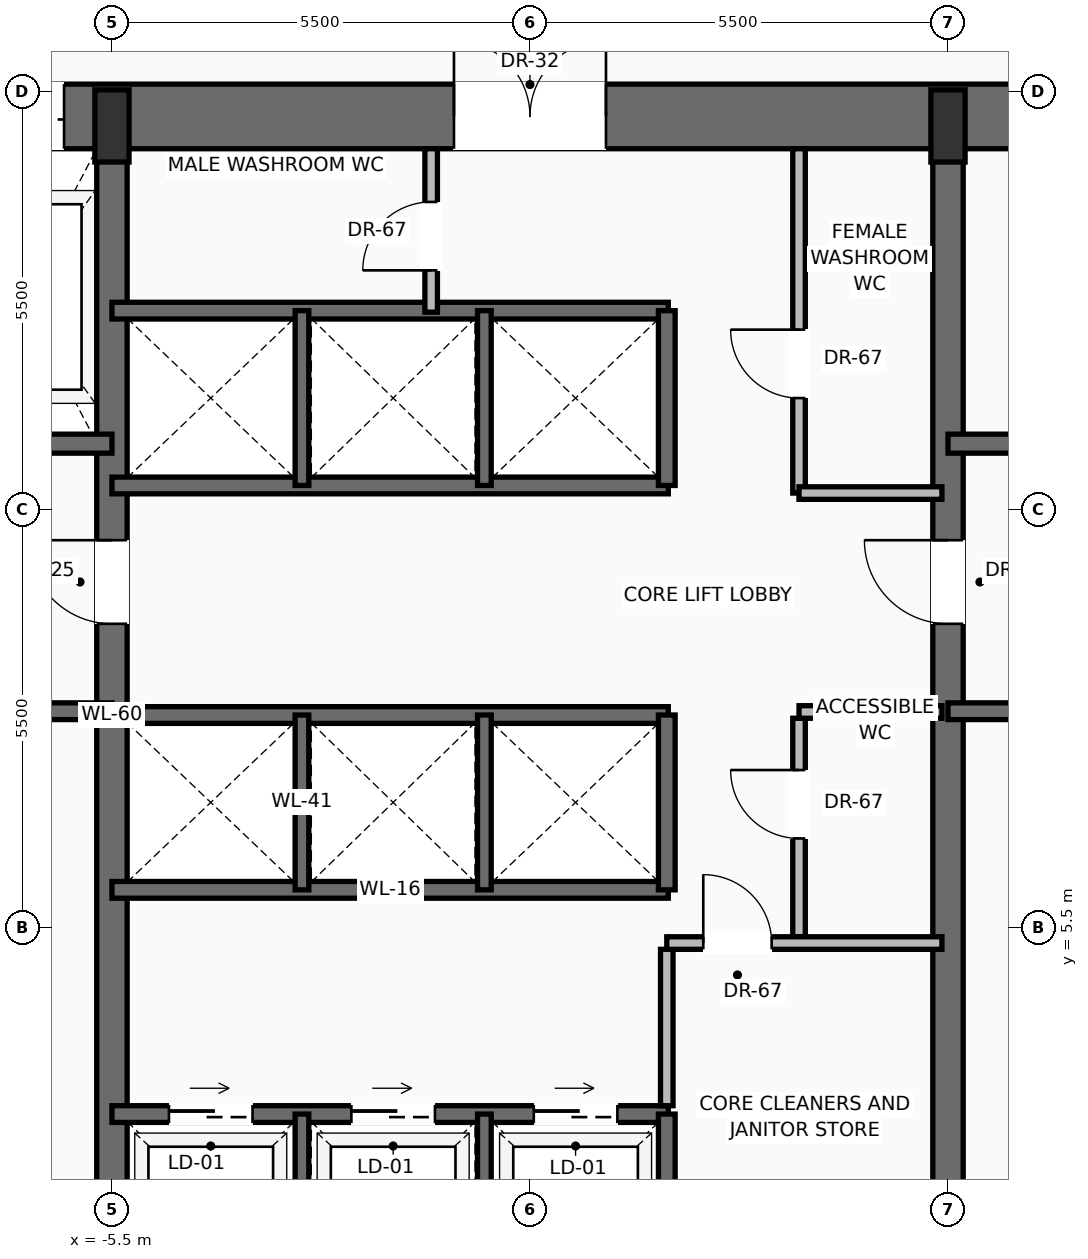
"""IFC4 building model, lengths in metres.
Left out: names, types, materials, properties, quantities, classifications, styles, units other than length and angle.
Written with IfcOpenShell. Run it as: python <this file> out.ifc"""

import sys

from ifc_helpers import new_model, si_unit, direction, frame, frame_2d, origin, origin_2d, place, context, subcontext, project, spatial, rectangle, extrude, source, transform, mapped, element, fill, save


model = new_model("IFC4")
c1 = context("Model", 3, precision=1e-05, world=origin(), true_north=direction((0.0, 1.0)))
c2 = subcontext(c1, "Body", "Model", "MODEL_VIEW")
j1 = project(units=[si_unit("LENGTHUNIT", "METRE"), si_unit("PLANEANGLEUNIT", "RADIAN")], contexts=[c1])
p1 = place(None, origin())
s1 = spatial("IfcSite", under=j1, at=p1, CompositionType="ELEMENT")
p2 = place(p1, origin())
s2 = spatial("IfcBuilding", under=s1, at=p2, CompositionType="ELEMENT")
p3 = place(p2, frame((0.0, 0.0, 53.4)))
s3 = spatial("IfcBuildingStorey", under=s2, at=p3, CompositionType="ELEMENT", Elevation=53.4)
p4 = place(p3, frame((-11.0, 16.175, 0.0), z_axis=(0.0, 0.0, 1.0), x_axis=(1.0, 0.0, 0.0)))
e1 = element("IfcWall", 1, at=p4, inside=s3, PredefinedType="SHEAR", context=c2, shape_type="SweptSolid", body=[
    extrude(rectangle(XDim=22.0, YDim=0.85, at=frame_2d((11.0, 0.0))), origin(), (0.0, 0.0, 1.0), 3.45),
])
p5 = place(p4, frame((3.57, 0.0, 0.0)))
e2 = element("IfcOpeningElement", 2, at=p5, cuts=e1, PredefinedType="OPENING", context=c2, shape_type="SweptSolid", body=[
    extrude(rectangle(XDim=1.3, YDim=2.3, at=frame_2d((0.65, 1.15))), frame((0.0, 0.435, 0.0), z_axis=(0.0, -1.0, 0.0), x_axis=(1.0, 0.0, 0.0)), (0.0, 0.0, 1.0), 0.87),
])
p6 = place(p4, frame((10.0, 0.0, 0.0)))
e3 = element("IfcOpeningElement", 3, at=p6, cuts=e1, PredefinedType="OPENING", context=c2, shape_type="SweptSolid", body=[
    extrude(rectangle(XDim=2.0, YDim=2.4, at=frame_2d((1.0, 1.2))), frame((0.0, 0.435, 0.0), z_axis=(0.0, -1.0, 0.0), x_axis=(1.0, 0.0, 0.0)), (0.0, 0.0, 1.0), 0.87),
])
p7 = place(p3, frame((-5.5, 0.425, 0.0), z_axis=(0.0, 0.0, 1.0), x_axis=(0.0, 1.0, 0.0)))
e4 = element("IfcWall", 4, at=p7, inside=s3, PredefinedType="SHEAR", context=c2, shape_type="SweptSolid", body=[
    extrude(rectangle(XDim=15.75, YDim=0.4, at=frame_2d((7.875, 0.0))), origin(), (0.0, 0.0, 1.0), 3.45),
])
p8 = place(p7, frame((9.075, 0.0, 0.0)))
e5 = element("IfcOpeningElement", 5, at=p8, cuts=e4, PredefinedType="OPENING", context=c2, shape_type="SweptSolid", body=[
    extrude(rectangle(XDim=1.1, YDim=2.2, at=frame_2d((0.55, 1.1))), frame((0.0, 0.21, 0.0), z_axis=(0.0, -1.0, 0.0), x_axis=(1.0, 0.0, 0.0)), (0.0, 0.0, 1.0), 0.42),
])
p9 = place(p3, frame((5.5, 0.425, 0.0), z_axis=(0.0, 0.0, 1.0), x_axis=(0.0, 1.0, 0.0)))
e6 = element("IfcWall", 6, at=p9, inside=s3, PredefinedType="SHEAR", context=c2, shape_type="SweptSolid", body=[
    extrude(rectangle(XDim=15.75, YDim=0.4, at=frame_2d((7.875, 0.0))), origin(), (0.0, 0.0, 1.0), 3.45),
])
p10 = place(p9, frame((9.075, 0.0, 0.0)))
e7 = element("IfcOpeningElement", 7, at=p10, cuts=e6, PredefinedType="OPENING", context=c2, shape_type="SweptSolid", body=[
    extrude(rectangle(XDim=1.1, YDim=2.2, at=frame_2d((0.55, 1.1))), frame((0.0, 0.21, 0.0), z_axis=(0.0, -1.0, 0.0), x_axis=(1.0, 0.0, 0.0)), (0.0, 0.0, 1.0), 0.42),
])
m1 = source(origin(), c2, "Body", "SweptSolid", [
    extrude(rectangle(XDim=0.45, YDim=0.95, at=origin_2d()), origin(), (0.0, 0.0, 1.0), 3.7),
])
for number, where, z_axis, x_axis in (
    (8, (-5.5, 16.05, 0.0), (0.0, 0.0, 1.0), (1.0, 0.0, 0.0)),
    (9, (5.5, 16.05, 0.0), (0.0, 0.0, 1.0), (1.0, 0.0, 0.0)),
):
    element("IfcColumn", number, at=place(p3, frame(where, z_axis=z_axis, x_axis=x_axis)), inside=s3, PredefinedType="PILASTER", context=c2, shape_type="MappedRepresentation", body=[
        mapped(m1, transform((0.0, 0.0, 0.0), scale=1.0)),
    ])
p11 = place(p3, frame((-5.5, 8.35, 0.0), z_axis=(0.0, 0.0, 1.0), x_axis=(-1.0, 0.0, 0.0)))
e10 = element("IfcWall", 10, at=p11, inside=s3, PredefinedType="SOLIDWALL", context=c2, shape_type="SweptSolid", body=[
    extrude(rectangle(XDim=4.65, YDim=0.22, at=frame_2d((2.325, 0.0))), origin(), (0.0, 0.0, 1.0), 3.45),
])
p12 = place(p11, frame((2.5, 0.0, 0.0)))
e11 = element("IfcOpeningElement", 11, at=p12, cuts=e10, PredefinedType="OPENING", context=c2, shape_type="SweptSolid", body=[
    extrude(rectangle(XDim=1.15, YDim=2.2, at=frame_2d((0.575, 1.1))), frame((0.0, 0.12, 0.0), z_axis=(0.0, -1.0, 0.0), x_axis=(1.0, 0.0, 0.0)), (0.0, 0.0, 1.0), 0.24),
])
p13 = place(p3, frame((-5.5, 11.87, 0.0), z_axis=(0.0, 0.0, 1.0), x_axis=(-1.0, 0.0, 0.0)))
e12 = element("IfcWall", 12, at=p13, inside=s3, PredefinedType="SOLIDWALL", context=c2, shape_type="SweptSolid", body=[
    extrude(rectangle(XDim=4.65, YDim=0.25, at=frame_2d((2.325, 0.0))), origin(), (0.0, 0.0, 1.0), 3.45),
])
p14 = place(p13, frame((2.95, 0.0, 0.0)))
e13 = element("IfcOpeningElement", 13, at=p14, cuts=e12, PredefinedType="OPENING", context=c2, shape_type="SweptSolid", body=[
    extrude(rectangle(XDim=1.2, YDim=2.25, at=frame_2d((0.6, 1.125))), frame((0.0, 0.135, 0.0), z_axis=(0.0, -1.0, 0.0), x_axis=(1.0, 0.0, 0.0)), (0.0, 0.0, 1.0), 0.27),
])
p15 = place(p3, frame((10.15, 8.35, 0.0), z_axis=(0.0, 0.0, 1.0), x_axis=(-1.0, 0.0, 0.0)))
e14 = element("IfcWall", 14, at=p15, inside=s3, PredefinedType="SOLIDWALL", context=c2, shape_type="SweptSolid", body=[
    extrude(rectangle(XDim=4.65, YDim=0.22, at=frame_2d((2.325, 0.0))), origin(), (0.0, 0.0, 1.0), 3.45),
])
p16 = place(p15, frame((1.0, 0.0, 0.0)))
e15 = element("IfcOpeningElement", 15, at=p16, cuts=e14, PredefinedType="OPENING", context=c2, shape_type="SweptSolid", body=[
    extrude(rectangle(XDim=1.15, YDim=2.2, at=frame_2d((0.575, 1.1))), frame((0.0, 0.12, 0.0), z_axis=(0.0, -1.0, 0.0), x_axis=(1.0, 0.0, 0.0)), (0.0, 0.0, 1.0), 0.24),
])
p17 = place(p3, frame((10.15, 11.87, 0.0), z_axis=(0.0, 0.0, 1.0), x_axis=(-1.0, 0.0, 0.0)))
e16 = element("IfcWall", 16, at=p17, inside=s3, PredefinedType="SOLIDWALL", context=c2, shape_type="SweptSolid", body=[
    extrude(rectangle(XDim=4.65, YDim=0.25, at=frame_2d((2.325, 0.0))), origin(), (0.0, 0.0, 1.0), 3.45),
])
p18 = place(p17, frame((0.5, 0.0, 0.0)))
e17 = element("IfcOpeningElement", 17, at=p18, cuts=e16, PredefinedType="OPENING", context=c2, shape_type="SweptSolid", body=[
    extrude(rectangle(XDim=1.2, YDim=2.25, at=frame_2d((0.6, 1.125))), frame((0.0, 0.135, 0.0), z_axis=(0.0, -1.0, 0.0), x_axis=(1.0, 0.0, 0.0)), (0.0, 0.0, 1.0), 0.27),
])
p19 = place(p3, frame((-5.5, 3.05, 0.0), z_axis=(0.0, 0.0, 1.0), x_axis=(1.0, 0.0, 0.0)))
e18 = element("IfcWall", 18, at=p19, inside=s3, PredefinedType="SOLIDWALL", context=c2, shape_type="SweptSolid", body=[
    extrude(rectangle(XDim=7.32, YDim=0.22, at=frame_2d((3.66, 0.0))), origin(), (0.0, 0.0, 1.0), 3.45),
])
p20 = place(p19, frame((0.75, 0.0, 0.0)))
e19 = element("IfcOpeningElement", 19, at=p20, cuts=e18, PredefinedType="OPENING", context=c2, shape_type="SweptSolid", body=[
    extrude(rectangle(XDim=1.1, YDim=2.2, at=frame_2d((0.55, 1.1))), frame((0.0, 0.12, 0.0), z_axis=(0.0, -1.0, 0.0), x_axis=(1.0, 0.0, 0.0)), (0.0, 0.0, 1.0), 0.24),
])
p21 = place(p19, frame((3.15, 0.0, 0.0)))
e20 = element("IfcOpeningElement", 20, at=p21, cuts=e18, PredefinedType="OPENING", context=c2, shape_type="SweptSolid", body=[
    extrude(rectangle(XDim=1.1, YDim=2.2, at=frame_2d((0.55, 1.1))), frame((0.0, 0.12, 0.0), z_axis=(0.0, -1.0, 0.0), x_axis=(1.0, 0.0, 0.0)), (0.0, 0.0, 1.0), 0.24),
])
p22 = place(p19, frame((5.55, 0.0, 0.0)))
e21 = element("IfcOpeningElement", 21, at=p22, cuts=e18, PredefinedType="OPENING", context=c2, shape_type="SweptSolid", body=[
    extrude(rectangle(XDim=1.1, YDim=2.2, at=frame_2d((0.55, 1.1))), frame((0.0, 0.12, 0.0), z_axis=(0.0, -1.0, 0.0), x_axis=(1.0, 0.0, 0.0)), (0.0, 0.0, 1.0), 0.24),
])
p23 = place(p3, frame((1.8, 0.85, 0.0), z_axis=(0.0, 0.0, 1.0), x_axis=(0.0, 1.0, 0.0)))
e22 = element("IfcWall", 22, at=p23, inside=s3, PredefinedType="SOLIDWALL", context=c2, shape_type="SweptSolid", body=[
    extrude(rectangle(XDim=2.2, YDim=0.22, at=frame_2d((1.1, 0.0))), origin(), (0.0, 0.0, 1.0), 3.45),
])
for number, where, z_axis, x_axis in (
    (23, (-3.0, 0.85, 0.0), (0.0, 0.0, 1.0), (0.0, 1.0, 0.0)),
    (24, (-0.6, 0.85, 0.0), (0.0, 0.0, 1.0), (0.0, 1.0, 0.0)),
):
    element("IfcWall", number, at=place(p3, frame(where, z_axis=z_axis, x_axis=x_axis)), inside=s3, PredefinedType="SOLIDWALL", context=c2, shape_type="SweptSolid", body=[
        extrude(rectangle(XDim=2.2, YDim=0.18, at=frame_2d((1.1, 0.0))), origin(), (0.0, 0.0, 1.0), 3.45),
    ])
p24 = place(p3, frame((1.8, 3.16, 0.0), z_axis=(0.0, 0.0, 1.0), x_axis=(0.0, 1.0, 0.0)))
e25 = element("IfcWall", 25, at=p24, inside=s3, PredefinedType="PARTITIONING", context=c2, shape_type="SweptSolid", body=[
    extrude(rectangle(XDim=2.058, YDim=0.165, at=frame_2d((1.029, 0.0))), origin(), (0.0, 0.0, 1.0), 3.442),
])
p25 = place(p3, frame((3.54, 5.383, 0.0), z_axis=(0.0, 0.0, 1.0), x_axis=(0.0, 1.0, 0.0)))
e26 = element("IfcWall", 26, at=p25, inside=s3, PredefinedType="PARTITIONING", context=c2, shape_type="SweptSolid", body=[
    extrude(rectangle(XDim=2.875, YDim=0.165, at=frame_2d((1.438, 0.0))), origin(), (0.0, 0.0, 1.0), 3.442),
])
p26 = place(p25, frame((1.294, 0.0, 0.0)))
e27 = element("IfcOpeningElement", 27, at=p26, cuts=e26, PredefinedType="OPENING", context=c2, shape_type="SweptSolid", body=[
    extrude(rectangle(XDim=0.9, YDim=2.1, at=frame_2d((0.45, 1.05))), frame((0.0, 0.093, 0.0), z_axis=(0.0, -1.0, 0.0), x_axis=(1.0, 0.0, 0.0)), (0.0, 0.0, 1.0), 0.185),
])
p27 = place(p3, frame((3.54, 8.34, 0.0), z_axis=(0.0, 0.0, 1.0), x_axis=(1.0, 0.0, 0.0)))
e28 = element("IfcWall", 28, at=p27, inside=s3, PredefinedType="PARTITIONING", context=c2, shape_type="SweptSolid", body=[
    extrude(rectangle(XDim=1.88, YDim=0.165, at=frame_2d((0.94, 0.0))), origin(), (0.0, 0.0, 1.0), 3.442),
])
p28 = place(p3, frame((1.8, 5.3, 0.0), z_axis=(0.0, 0.0, 1.0), x_axis=(1.0, 0.0, 0.0)))
e29 = element("IfcWall", 29, at=p28, inside=s3, PredefinedType="PARTITIONING", context=c2, shape_type="SweptSolid", body=[
    extrude(rectangle(XDim=3.62, YDim=0.165, at=frame_2d((1.81, 0.0))), origin(), (0.0, 0.0, 1.0), 3.442),
])
p29 = place(p28, frame((0.48, 0.0, 0.0)))
e30 = element("IfcOpeningElement", 30, at=p29, cuts=e29, PredefinedType="OPENING", context=c2, shape_type="SweptSolid", body=[
    extrude(rectangle(XDim=0.9, YDim=2.1, at=frame_2d((0.45, 1.05))), frame((0.0, 0.093, 0.0), z_axis=(0.0, -1.0, 0.0), x_axis=(1.0, 0.0, 0.0)), (0.0, 0.0, 1.0), 0.185),
])
for number, where, z_axis, x_axis in (
    (31, (-5.5, 6.0, 0.0), (0.0, 0.0, 1.0), (1.0, 0.0, 0.0)),
    (32, (-5.5, 8.3, 0.0), (0.0, 0.0, 1.0), (1.0, 0.0, 0.0)),
):
    element("IfcWall", number, at=place(p3, frame(where, z_axis=z_axis, x_axis=x_axis)), inside=s3, PredefinedType="SOLIDWALL", context=c2, shape_type="SweptSolid", body=[
        extrude(rectangle(XDim=7.32, YDim=0.22, at=frame_2d((3.66, 0.0))), origin(), (0.0, 0.0, 1.0), 3.45),
    ])
p30 = place(p3, frame((1.8, 6.0, 0.0), z_axis=(0.0, 0.0, 1.0), x_axis=(0.0, 1.0, 0.0)))
e33 = element("IfcWall", 33, at=p30, inside=s3, PredefinedType="SOLIDWALL", context=c2, shape_type="SweptSolid", body=[
    extrude(rectangle(XDim=2.3, YDim=0.22, at=frame_2d((1.15, 0.0))), origin(), (0.0, 0.0, 1.0), 3.45),
])
for number, where, z_axis, x_axis in (
    (34, (-3.0, 6.0, 0.0), (0.0, 0.0, 1.0), (0.0, 1.0, 0.0)),
    (35, (-0.6, 6.0, 0.0), (0.0, 0.0, 1.0), (0.0, 1.0, 0.0)),
):
    element("IfcWall", number, at=place(p3, frame(where, z_axis=z_axis, x_axis=x_axis)), inside=s3, PredefinedType="SOLIDWALL", context=c2, shape_type="SweptSolid", body=[
        extrude(rectangle(XDim=2.3, YDim=0.18, at=frame_2d((1.15, 0.0))), origin(), (0.0, 0.0, 1.0), 3.45),
    ])
for number, where, z_axis, x_axis in (
    (36, (-5.5, 11.32, 0.0), (0.0, 0.0, 1.0), (1.0, 0.0, 0.0)),
    (37, (-5.5, 13.62, 0.0), (0.0, 0.0, 1.0), (1.0, 0.0, 0.0)),
):
    element("IfcWall", number, at=place(p3, frame(where, z_axis=z_axis, x_axis=x_axis)), inside=s3, PredefinedType="SOLIDWALL", context=c2, shape_type="SweptSolid", body=[
        extrude(rectangle(XDim=7.32, YDim=0.22, at=frame_2d((3.66, 0.0))), origin(), (0.0, 0.0, 1.0), 3.45),
    ])
p31 = place(p3, frame((1.8, 11.32, 0.0), z_axis=(0.0, 0.0, 1.0), x_axis=(0.0, 1.0, 0.0)))
e38 = element("IfcWall", 38, at=p31, inside=s3, PredefinedType="SOLIDWALL", context=c2, shape_type="SweptSolid", body=[
    extrude(rectangle(XDim=2.3, YDim=0.22, at=frame_2d((1.15, 0.0))), origin(), (0.0, 0.0, 1.0), 3.45),
])
for number, where, z_axis, x_axis in (
    (39, (-3.0, 11.32, 0.0), (0.0, 0.0, 1.0), (0.0, 1.0, 0.0)),
    (40, (-0.6, 11.32, 0.0), (0.0, 0.0, 1.0), (0.0, 1.0, 0.0)),
):
    element("IfcWall", number, at=place(p3, frame(where, z_axis=z_axis, x_axis=x_axis)), inside=s3, PredefinedType="SOLIDWALL", context=c2, shape_type="SweptSolid", body=[
        extrude(rectangle(XDim=2.3, YDim=0.18, at=frame_2d((1.15, 0.0))), origin(), (0.0, 0.0, 1.0), 3.45),
    ])
p32 = place(p3, frame((-1.3, 13.6, 0.0), z_axis=(0.0, 0.0, 1.0), x_axis=(0.0, 1.0, 0.0)))
e41 = element("IfcWall", 41, at=p32, inside=s3, PredefinedType="PARTITIONING", context=c2, shape_type="SweptSolid", body=[
    extrude(rectangle(XDim=2.15, YDim=0.165, at=frame_2d((1.075, 0.0))), origin(), (0.0, 0.0, 1.0), 3.442),
])
p33 = place(p32, frame((0.55, 0.0, 0.0)))
e42 = element("IfcOpeningElement", 42, at=p33, cuts=e41, PredefinedType="OPENING", context=c2, shape_type="SweptSolid", body=[
    extrude(rectangle(XDim=0.9, YDim=2.1, at=frame_2d((0.45, 1.05))), frame((0.0, 0.093, 0.0), z_axis=(0.0, -1.0, 0.0), x_axis=(1.0, 0.0, 0.0)), (0.0, 0.0, 1.0), 0.185),
])
p34 = place(p3, frame((3.54, 11.22, 0.0), z_axis=(0.0, 0.0, 1.0), x_axis=(0.0, 1.0, 0.0)))
e43 = element("IfcWall", 43, at=p34, inside=s3, PredefinedType="PARTITIONING", context=c2, shape_type="SweptSolid", body=[
    extrude(rectangle(XDim=4.53, YDim=0.165, at=frame_2d((2.265, 0.0))), origin(), (0.0, 0.0, 1.0), 3.442),
])
p35 = place(p34, frame((1.25, 0.0, 0.0)))
e44 = element("IfcOpeningElement", 44, at=p35, cuts=e43, PredefinedType="OPENING", context=c2, shape_type="SweptSolid", body=[
    extrude(rectangle(XDim=0.9, YDim=2.1, at=frame_2d((0.45, 1.05))), frame((0.0, 0.093, 0.0), z_axis=(0.0, -1.0, 0.0), x_axis=(1.0, 0.0, 0.0)), (0.0, 0.0, 1.0), 0.185),
])
p36 = place(p3, frame((3.54, 11.22, 0.0), z_axis=(0.0, 0.0, 1.0), x_axis=(1.0, 0.0, 0.0)))
e45 = element("IfcWall", 45, at=p36, inside=s3, PredefinedType="PARTITIONING", context=c2, shape_type="SweptSolid", body=[
    extrude(rectangle(XDim=1.88, YDim=0.165, at=frame_2d((0.94, 0.0))), origin(), (0.0, 0.0, 1.0), 3.442),
])
m2 = source(origin(), c2, "Body", "SweptSolid", [
    extrude(rectangle(XDim=1.1, YDim=2.2, at=frame_2d((0.55, 1.1))), frame((0.0, 0.025, 0.0), z_axis=(0.0, -1.0, 0.0), x_axis=(1.0, 0.0, 0.0)), (0.0, 0.0, 1.0), 0.05),
])
p37 = place(p8, origin())
e46 = element("IfcDoor", 46, at=p37, inside=s3, OperationType="SINGLE_SWING_RIGHT", PredefinedType="DOOR", context=c2, shape_type="MappedRepresentation", body=[
    mapped(m2, transform((0.0, 0.0, 0.0), scale=1.0)),
])
fill(e5, e46)
m3 = source(origin(), c2, "Body", "SweptSolid", [
    extrude(rectangle(XDim=1.3, YDim=2.3, at=frame_2d((0.65, 1.15))), frame((0.0, 0.025, 0.0), z_axis=(0.0, -1.0, 0.0), x_axis=(1.0, 0.0, 0.0)), (0.0, 0.0, 1.0), 0.05),
])
p38 = place(p5, origin())
e47 = element("IfcDoor", 47, at=p38, inside=s3, OperationType="SLIDING_TO_RIGHT", PredefinedType="DOOR", context=c2, shape_type="MappedRepresentation", body=[
    mapped(m3, transform((0.0, 0.0, 0.0), scale=1.0)),
])
fill(e2, e47)
p39 = place(p10, origin())
e48 = element("IfcDoor", 48, at=p39, inside=s3, OperationType="SINGLE_SWING_RIGHT", PredefinedType="DOOR", context=c2, shape_type="MappedRepresentation", body=[
    mapped(m2, transform((0.0, 0.0, 0.0), scale=1.0)),
])
fill(e7, e48)
m4 = source(origin(), c2, "Body", "SweptSolid", [
    extrude(rectangle(XDim=2.0, YDim=2.4, at=frame_2d((1.0, 1.2))), frame((0.0, 0.025, 0.0), z_axis=(0.0, -1.0, 0.0), x_axis=(1.0, 0.0, 0.0)), (0.0, 0.0, 1.0), 0.05),
])
p40 = place(p6, origin())
e49 = element("IfcDoor", 49, at=p40, inside=s3, OperationType="DOUBLE_DOOR_SINGLE_SWING", PredefinedType="DOOR", context=c2, shape_type="MappedRepresentation", body=[
    mapped(m4, transform((0.0, 0.0, 0.0), scale=1.0)),
])
fill(e3, e49)
m5 = source(origin(), c2, "Body", "SweptSolid", [
    extrude(rectangle(XDim=1.1, YDim=2.2, at=frame_2d((0.55, 1.1))), frame((0.0, 0.025, 0.0), z_axis=(0.0, -1.0, 0.0), x_axis=(1.0, 0.0, 0.0)), (0.0, 0.0, 1.0), 0.05),
])
p41 = place(p20, origin())
e50 = element("IfcDoor", 50, at=p41, inside=s3, OperationType="SLIDING_TO_RIGHT", PredefinedType="DOOR", context=c2, shape_type="MappedRepresentation", body=[
    mapped(m5, transform((0.0, 0.0, 0.0), scale=1.0)),
])
fill(e19, e50)
p42 = place(p21, origin())
e51 = element("IfcDoor", 51, at=p42, inside=s3, OperationType="SLIDING_TO_RIGHT", PredefinedType="DOOR", context=c2, shape_type="MappedRepresentation", body=[
    mapped(m5, transform((0.0, 0.0, 0.0), scale=1.0)),
])
fill(e20, e51)
p43 = place(p22, origin())
e52 = element("IfcDoor", 52, at=p43, inside=s3, OperationType="SLIDING_TO_RIGHT", PredefinedType="DOOR", context=c2, shape_type="MappedRepresentation", body=[
    mapped(m5, transform((0.0, 0.0, 0.0), scale=1.0)),
])
fill(e21, e52)
m6 = source(origin(), c2, "Body", "SweptSolid", [
    extrude(rectangle(XDim=0.9, YDim=2.1, at=frame_2d((0.45, 1.05))), frame((0.0, 0.025, 0.0), z_axis=(0.0, -1.0, 0.0), x_axis=(1.0, 0.0, 0.0)), (0.0, 0.0, 1.0), 0.05),
])
p44 = place(p29, origin())
e53 = element("IfcDoor", 53, at=p44, inside=s3, OperationType="SINGLE_SWING_LEFT", PredefinedType="DOOR", context=c2, shape_type="MappedRepresentation", body=[
    mapped(m6, transform((0.0, 0.0, 0.0), scale=1.0)),
])
fill(e30, e53)
p45 = place(p26, origin())
e54 = element("IfcDoor", 54, at=p45, inside=s3, OperationType="SINGLE_SWING_RIGHT", PredefinedType="DOOR", context=c2, shape_type="MappedRepresentation", body=[
    mapped(m6, transform((0.0, 0.0, 0.0), scale=1.0)),
])
fill(e27, e54)
p46 = place(p33, origin())
e55 = element("IfcDoor", 55, at=p46, inside=s3, OperationType="SINGLE_SWING_LEFT", PredefinedType="DOOR", context=c2, shape_type="MappedRepresentation", body=[
    mapped(m6, transform((0.0, 0.0, 0.0), scale=1.0)),
])
fill(e42, e55)
p47 = place(p35, origin())
e56 = element("IfcDoor", 56, at=p47, inside=s3, OperationType="SINGLE_SWING_RIGHT", PredefinedType="DOOR", context=c2, shape_type="MappedRepresentation", body=[
    mapped(m6, transform((0.0, 0.0, 0.0), scale=1.0)),
])
fill(e44, e56)
save(model, sys.argv[1])
